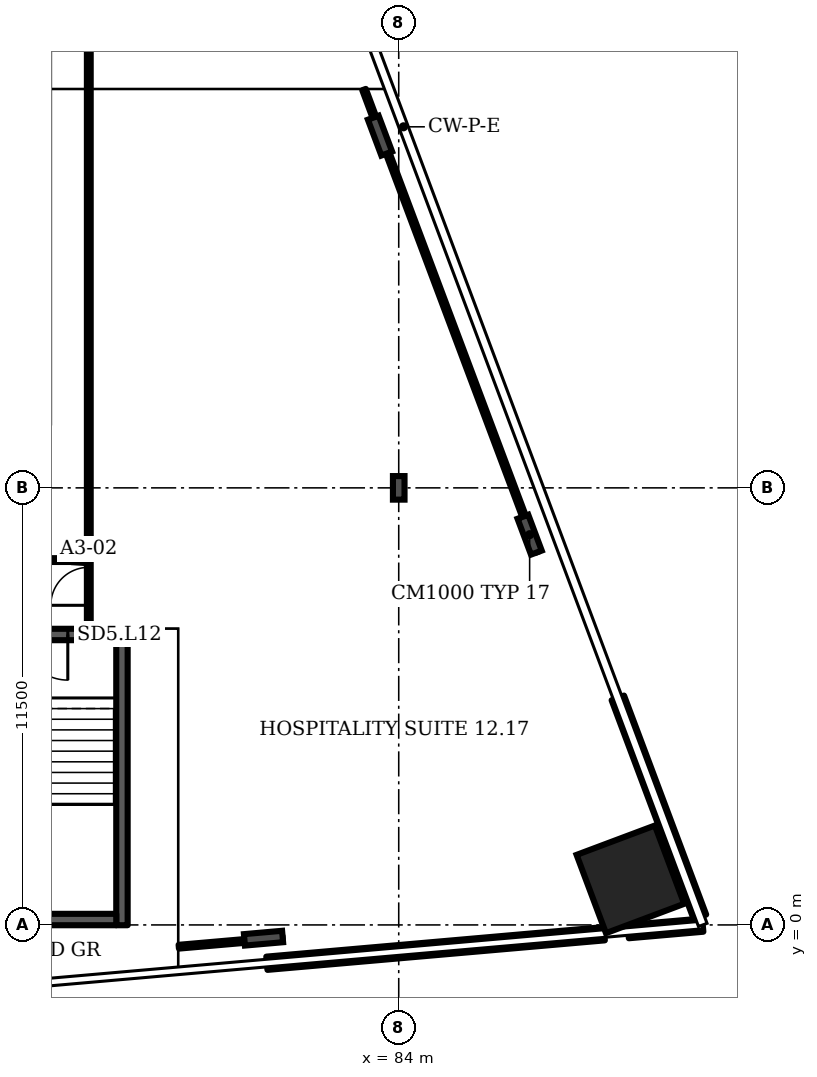
"""IFC4 building model, lengths in metres.
Left out: names, types, materials, properties, quantities, classifications, styles, units other than length and angle.
Written with IfcOpenShell. Run it as: python <this file> out.ifc"""

import sys

from ifc_helpers import new_model, si_unit, direction, frame, frame_2d, origin, origin_2d, place, context, subcontext, project, spatial, rectangle, i_section, extrude, element, fill, save


model = new_model("IFC4")
c1 = context("Model", 3, precision=1e-05, world=origin(), true_north=direction((0.0, 1.0)))
c2 = subcontext(c1, "Body", "Model", "MODEL_VIEW")
j1 = project(units=[si_unit("LENGTHUNIT", "METRE"), si_unit("PLANEANGLEUNIT", "RADIAN")], contexts=[c1])
p1 = place(None, origin())
s1 = spatial("IfcSite", under=j1, at=p1, CompositionType="ELEMENT")
p2 = place(p1, origin())
s2 = spatial("IfcBuilding", under=s1, at=p2, CompositionType="ELEMENT")
p3 = place(p2, frame((0.0, 0.0, 63.1)))
s3 = spatial("IfcBuildingStorey", under=s2, at=p3, CompositionType="ELEMENT", Elevation=63.1)
p4 = place(p3, frame((90.096, 1.2, 0.0), z_axis=(0.0, 0.0, 1.0), x_axis=(-0.351123, 0.936328, 0.0)))
e1 = element("IfcColumn", 1, at=p4, inside=s3, PredefinedType="COLUMN", context=c2, shape_type="SweptSolid", body=[
    extrude(rectangle(XDim=2.2, YDim=2.2, at=origin_2d()), origin(), (0.0, 0.0, 1.0), 3.6),
])
for number, where, z_axis, x_axis in (
    (2, (80.442, -0.349, 0.0), (0.0, 0.0, 1.0), (0.087, -0.996, 0.0)),
    (3, (87.445, 10.268, 0.0), (0.0, 0.0, 1.0), (0.936, 0.351, 0.0)),
    (4, (83.507, 20.768, 0.0), (0.0, 0.0, 1.0), (0.936, 0.351, 0.0)),
):
    element("IfcColumn", number, at=place(p3, frame(where, z_axis=z_axis, x_axis=x_axis)), inside=s3, PredefinedType="COLUMN", context=c2, shape_type="SweptSolid", body=[
        extrude(i_section(OverallWidth=0.302, OverallDepth=1.008, WebThickness=0.021, FlangeThickness=0.04, FilletRadius=0.03, at=origin_2d()), origin(), (0.0, 0.0, 1.0), 3.6),
    ])
p5 = place(p3, frame((84.0, 11.5, 0.0), z_axis=(0.0, 0.0, 1.0), x_axis=(1.0, 0.0, 0.0)))
e5 = element("IfcColumn", 5, at=p5, inside=s3, PredefinedType="COLUMN", context=c2, shape_type="SweptSolid", body=[
    extrude(i_section(OverallWidth=0.305, OverallDepth=0.62, WebThickness=0.021, FlangeThickness=0.04, FilletRadius=0.027, at=origin_2d()), origin(), (0.0, 0.0, 1.0), 3.6),
])
p6 = place(p3, frame((80.53, -1.009, 0.0), z_axis=(0.0, 0.0, 1.0), x_axis=(0.996198, 0.087169, 0.0)))
e6 = element("IfcWall", 6, at=p6, inside=s3, PredefinedType="SOLIDWALL", context=c2, shape_type="SweptSolid", body=[
    extrude(rectangle(XDim=8.912, YDim=0.35, at=frame_2d((4.456, 0.0))), origin(), (0.0, 0.0, 1.0), 1.0),
])
p7 = place(p3, frame((90.039, -0.177, 0.0), z_axis=(0.0, 0.0, 1.0), x_axis=(0.996193, 0.08717, 0.0)))
e7 = element("IfcWall", 7, at=p7, inside=s3, PredefinedType="SOLIDWALL", context=c2, shape_type="SweptSolid", body=[
    extrude(rectangle(XDim=1.969, YDim=0.35, at=frame_2d((0.984, 0.0))), origin(), (0.0, 0.0, 1.0), 1.0),
])
p8 = place(p3, frame((91.926, 0.211, 0.0), z_axis=(0.0, 0.0, 1.0), x_axis=(-0.351118, 0.936328, 0.0)))
e8 = element("IfcWall", 8, at=p8, inside=s3, PredefinedType="SOLIDWALL", context=c2, shape_type="SweptSolid", body=[
    extrude(rectangle(XDim=6.154, YDim=0.35, at=frame_2d((3.077, 0.0))), origin(), (0.0, 0.0, 1.0), 1.0),
])
p9 = place(p3, frame((72.518, 7.642, 0.0), z_axis=(0.0, 0.0, 1.0), x_axis=(1.0, 0.0, 0.0)))
e9 = element("IfcWall", 9, at=p9, inside=s3, PredefinedType="SHEAR", context=c2, shape_type="SweptSolid", body=[
    extrude(rectangle(XDim=4.35, YDim=0.3, at=frame_2d((2.175, 0.0))), origin(), (0.0, 0.0, 1.0), 3.2),
])
p10 = place(p9, frame((1.575, 0.0, 0.0)))
e10 = element("IfcOpeningElement", 10, at=p10, cuts=e9, PredefinedType="OPENING", context=c2, shape_type="SweptSolid", body=[
    extrude(rectangle(XDim=1.2, YDim=2.1, at=frame_2d((0.6, 1.05))), frame((0.0, 0.16, 0.0), z_axis=(0.0, -1.0, 0.0), x_axis=(1.0, 0.0, 0.0)), (0.0, 0.0, 1.0), 0.32),
])
p11 = place(p3, frame((65.91, 9.6, 0.0), z_axis=(0.0, 0.0, 1.0), x_axis=(1.0, 0.0, 0.0)))
e11 = element("IfcWall", 11, at=p11, inside=s3, PredefinedType="PARTITIONING", context=c2, shape_type="SweptSolid", body=[
    extrude(rectangle(XDim=9.485, YDim=0.1, at=frame_2d((4.743, 0.0))), origin(), (0.0, 0.0, 1.0), 3.2),
])
p12 = place(p3, frame((75.43, 10.045, 0.0), z_axis=(0.0, 0.0, 1.0), x_axis=(1.0, 0.0, 0.0)))
e12 = element("IfcWall", 12, at=p12, inside=s3, PredefinedType="PARTITIONING", context=c2, shape_type="SweptSolid", body=[
    extrude(rectangle(XDim=0.16, YDim=0.1, at=frame_2d((0.08, 0.0))), origin(), (0.0, 0.0, 1.0), 3.2),
])
p13 = place(p3, frame((75.725, 9.575, 0.0), z_axis=(0.0, 0.0, 1.0), x_axis=(-0.99817, 0.06054, 0.0)))
e13 = element("IfcWall", 13, at=p13, inside=s3, PredefinedType="PARTITIONING", context=c2, shape_type="SweptSolid", body=[
    extrude(rectangle(XDim=0.331, YDim=0.1, at=frame_2d((0.165, 0.0))), origin(), (0.0, 0.0, 1.0), 3.2),
])
p14 = place(p3, frame((75.725, 9.575, 0.0), z_axis=(0.0, 0.0, 1.0), x_axis=(0.0, 1.0, 0.0)))
e14 = element("IfcWall", 14, at=p14, inside=s3, PredefinedType="PARTITIONING", context=c2, shape_type="SweptSolid", body=[
    extrude(rectangle(XDim=0.45, YDim=0.1, at=frame_2d((0.225, 0.0))), origin(), (0.0, 0.0, 1.0), 3.2),
])
p15 = place(p3, frame((75.845, 7.812, 0.0), z_axis=(0.0, 0.0, 1.0), x_axis=(0.0, 1.0, 0.0)))
e15 = element("IfcWall", 15, at=p15, inside=s3, PredefinedType="PARTITIONING", context=c2, shape_type="SweptSolid", body=[
    extrude(rectangle(XDim=15.513, YDim=0.1, at=frame_2d((7.756, 0.0))), origin(), (0.0, 0.0, 1.0), 3.2),
])
p16 = place(p15, frame((0.598, 0.0, 0.0)))
e16 = element("IfcOpeningElement", 16, at=p16, cuts=e15, PredefinedType="OPENING", context=c2, shape_type="SweptSolid", body=[
    extrude(rectangle(XDim=1.0, YDim=2.1, at=frame_2d((0.5, 1.05))), frame((0.0, 0.06, 0.0), z_axis=(0.0, -1.0, 0.0), x_axis=(1.0, 0.0, 0.0)), (0.0, 0.0, 1.0), 0.12),
])
p17 = place(p3, frame((78.212, -0.573, 0.0), z_axis=(0.0, 0.0, 1.0), x_axis=(0.996224, 0.086779, 0.0)))
e17 = element("IfcWall", 17, at=p17, inside=s3, PredefinedType="PARTITIONING", context=c2, shape_type="SweptSolid", body=[
    extrude(rectangle(XDim=2.743, YDim=0.1, at=frame_2d((1.372, 0.0))), origin(), (0.0, 0.0, 1.0), 2.58),
])
p18 = place(p3, frame((83.71, 20.31, 0.0), z_axis=(0.0, 0.0, 1.0), x_axis=(-0.349322, 0.937005, 0.0)))
e18 = element("IfcWall", 18, at=p18, inside=s3, PredefinedType="PARTITIONING", context=c2, shape_type="SweptSolid", body=[
    extrude(rectangle(XDim=1.782, YDim=0.1, at=frame_2d((0.891, 0.0))), origin(), (0.0, 0.0, 1.0), 2.58),
])
p19 = place(p3, frame((87.65, 9.81, 0.0), z_axis=(0.0, 0.0, 1.0), x_axis=(-0.351395, 0.936227, 0.0)))
e19 = element("IfcWall", 19, at=p19, inside=s3, PredefinedType="PARTITIONING", context=c2, shape_type="SweptSolid", body=[
    extrude(rectangle(XDim=11.226, YDim=0.1, at=frame_2d((5.613, 0.0))), origin(), (0.0, 0.0, 1.0), 2.58),
])
p20 = place(p3, frame((76.718, -0.008, 0.0), z_axis=(0.0, 0.0, 1.0), x_axis=(0.0, 1.0, 0.0)))
e20 = element("IfcWall", 20, at=p20, inside=s3, PredefinedType="SHEAR", context=c2, shape_type="SweptSolid", body=[
    extrude(rectangle(XDim=7.5, YDim=0.3, at=frame_2d((3.75, 0.0))), origin(), (0.0, 0.0, 1.0), 3.2),
])
p21 = place(p3, frame((72.817, 0.142, 0.0), z_axis=(0.0, 0.0, 1.0), x_axis=(1.0, 0.0, 0.0)))
e21 = element("IfcWall", 21, at=p21, inside=s3, PredefinedType="SHEAR", context=c2, shape_type="SweptSolid", body=[
    extrude(rectangle(XDim=3.75, YDim=0.3, at=frame_2d((1.875, 0.0))), origin(), (0.0, 0.0, 1.0), 3.2),
])
p22 = place(p10, origin())
e22 = element("IfcDoor", 22, at=p22, inside=s3, OperationType="SINGLE_SWING_RIGHT", PredefinedType="DOOR", context=c2, shape_type="SweptSolid", body=[
    extrude(rectangle(XDim=1.2, YDim=2.1, at=frame_2d((0.6, 1.05))), frame((0.0, 0.025, 0.0), z_axis=(0.0, -1.0, 0.0), x_axis=(1.0, 0.0, 0.0)), (0.0, 0.0, 1.0), 0.05),
])
fill(e10, e22)
p23 = place(p16, origin())
e23 = element("IfcDoor", 23, at=p23, inside=s3, OperationType="SINGLE_SWING_LEFT", PredefinedType="DOOR", context=c2, shape_type="SweptSolid", body=[
    extrude(rectangle(XDim=1.0, YDim=2.1, at=frame_2d((0.5, 1.05))), frame((0.0, 0.025, 0.0), z_axis=(0.0, -1.0, 0.0), x_axis=(1.0, 0.0, 0.0)), (0.0, 0.0, 1.0), 0.05),
])
fill(e16, e23)
save(model, sys.argv[1])
